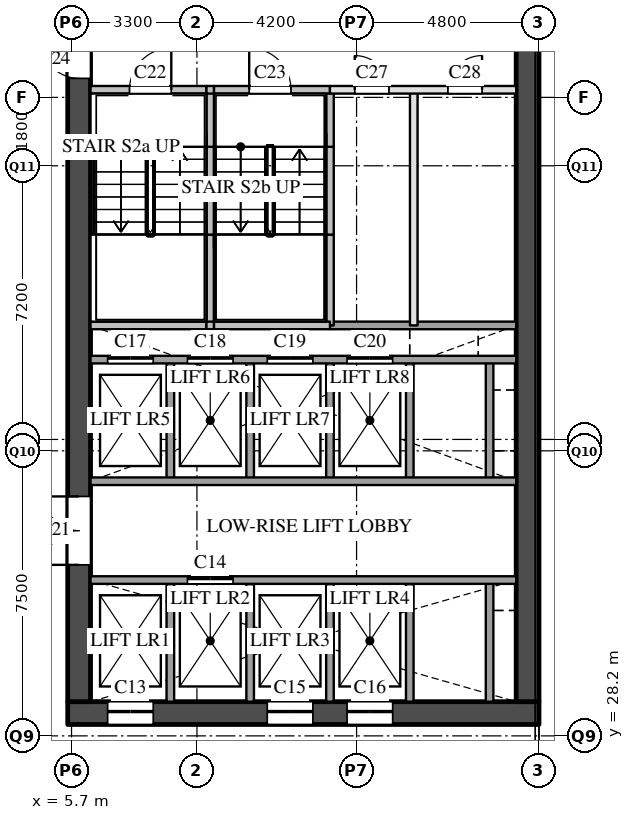
"""IFC4 building model, lengths in metres.
Left out: names, types, materials, properties, quantities, classifications, styles, units other than length and angle.
Written with IfcOpenShell. Run it as: python <this file> out.ifc"""

import sys

from ifc_helpers import new_model, si_unit, direction, frame, frame_2d, origin, place, context, subcontext, project, spatial, rectangle, extrude, element, fill, save


model = new_model("IFC4")
c1 = context("Model", 3, precision=1e-05, world=origin(), true_north=direction((0.0, 1.0)))
c2 = subcontext(c1, "Body", "Model", "MODEL_VIEW")
j1 = project(units=[si_unit("LENGTHUNIT", "METRE"), si_unit("PLANEANGLEUNIT", "RADIAN")], contexts=[c1])
p1 = place(None, origin())
s1 = spatial("IfcSite", under=j1, at=p1, CompositionType="ELEMENT")
p2 = place(p1, origin())
s2 = spatial("IfcBuilding", under=s1, at=p2, CompositionType="ELEMENT")
p3 = place(p2, frame((0.0, 0.0, 21.0)))
s3 = spatial("IfcBuildingStorey", under=s2, at=p3, CompositionType="ELEMENT", Elevation=21.0)
p4 = place(p3, frame((5.6, 28.8, 0.0), z_axis=(0.0, 0.0, 1.0), x_axis=(1.0, 0.0, 0.0)))
e1 = element("IfcWall", 1, at=p4, inside=s3, PredefinedType="SHEAR", context=c2, shape_type="SweptSolid", body=[
    extrude(rectangle(XDim=12.4, YDim=0.6, at=frame_2d((6.2, 0.0))), origin(), (0.0, 0.0, 1.0), 4.55),
])
p5 = place(p4, frame((1.05, 0.0, 0.0)))
e2 = element("IfcOpeningElement", 2, at=p5, cuts=e1, PredefinedType="OPENING", context=c2, shape_type="SweptSolid", body=[
    extrude(rectangle(XDim=1.2, YDim=2.1, at=frame_2d((0.6, 1.05))), frame((0.0, 0.31, 0.0), z_axis=(0.0, -1.0, 0.0), x_axis=(1.0, 0.0, 0.0)), (0.0, 0.0, 1.0), 0.62),
])
p6 = place(p4, frame((5.25, 0.0, 0.0)))
e3 = element("IfcOpeningElement", 3, at=p6, cuts=e1, PredefinedType="OPENING", context=c2, shape_type="SweptSolid", body=[
    extrude(rectangle(XDim=1.2, YDim=2.1, at=frame_2d((0.6, 1.05))), frame((0.0, 0.31, 0.0), z_axis=(0.0, -1.0, 0.0), x_axis=(1.0, 0.0, 0.0)), (0.0, 0.0, 1.0), 0.62),
])
p7 = place(p4, frame((7.35, 0.0, 0.0)))
e4 = element("IfcOpeningElement", 4, at=p7, cuts=e1, PredefinedType="OPENING", context=c2, shape_type="SweptSolid", body=[
    extrude(rectangle(XDim=1.2, YDim=2.1, at=frame_2d((0.6, 1.05))), frame((0.0, 0.31, 0.0), z_axis=(0.0, -1.0, 0.0), x_axis=(1.0, 0.0, 0.0)), (0.0, 0.0, 1.0), 0.62),
])
p8 = place(p3, frame((5.9, 29.1, 0.0), z_axis=(0.0, 0.0, 1.0), x_axis=(0.0, 1.0, 0.0)))
e5 = element("IfcWall", 5, at=p8, inside=s3, PredefinedType="SHEAR", context=c2, shape_type="SweptSolid", body=[
    extrude(rectangle(XDim=20.3, YDim=0.6, at=frame_2d((10.15, 0.0))), origin(), (0.0, 0.0, 1.0), 4.55),
])
p9 = place(p8, frame((3.6, 0.0, 0.0)))
e6 = element("IfcOpeningElement", 6, at=p9, cuts=e5, PredefinedType="OPENING", context=c2, shape_type="SweptSolid", body=[
    extrude(rectangle(XDim=1.8, YDim=2.1, at=frame_2d((0.9, 1.05))), frame((0.0, 0.31, 0.0), z_axis=(0.0, -1.0, 0.0), x_axis=(1.0, 0.0, 0.0)), (0.0, 0.0, 1.0), 0.62),
])
p10 = place(p8, frame((16.4, 0.0, 0.0)))
e7 = element("IfcOpeningElement", 7, at=p10, cuts=e5, PredefinedType="OPENING", context=c2, shape_type="SweptSolid", body=[
    extrude(rectangle(XDim=1.0, YDim=2.1, at=frame_2d((0.5, 1.05))), frame((0.0, 0.31, 0.0), z_axis=(0.0, -1.0, 0.0), x_axis=(1.0, 0.0, 0.0)), (0.0, 0.0, 1.0), 0.62),
])
p11 = place(p3, frame((17.7, 29.1, 0.0), z_axis=(0.0, 0.0, 1.0), x_axis=(0.0, 1.0, 0.0)))
e8 = element("IfcWall", 8, at=p11, inside=s3, PredefinedType="SHEAR", context=c2, shape_type="SweptSolid", body=[
    extrude(rectangle(XDim=20.3, YDim=0.6, at=frame_2d((10.15, 0.0))), origin(), (0.0, 0.0, 1.0), 4.55),
])
p12 = place(p3, frame((8.3, 29.1, 0.0), z_axis=(0.0, 0.0, 1.0), x_axis=(0.0, 1.0, 0.0)))
e9 = element("IfcWall", 9, at=p12, inside=s3, PredefinedType="SOLIDWALL", context=c2, shape_type="SweptSolid", body=[
    extrude(rectangle(XDim=3.2, YDim=0.2, at=frame_2d((1.6, 0.0))), origin(), (0.0, 0.0, 1.0), 4.55),
])
p13 = place(p3, frame((8.3, 34.9, 0.0), z_axis=(0.0, 0.0, 1.0), x_axis=(0.0, 1.0, 0.0)))
e10 = element("IfcWall", 10, at=p13, inside=s3, PredefinedType="SOLIDWALL", context=c2, shape_type="SweptSolid", body=[
    extrude(rectangle(XDim=3.2, YDim=0.2, at=frame_2d((1.6, 0.0))), origin(), (0.0, 0.0, 1.0), 4.55),
])
p14 = place(p3, frame((9.35, 39.0, 0.0), z_axis=(0.0, 0.0, 1.0), x_axis=(0.0, 1.0, 0.0)))
e11 = element("IfcWall", 11, at=p14, inside=s3, PredefinedType="SOLIDWALL", context=c2, shape_type="SweptSolid", body=[
    extrude(rectangle(XDim=2.39, YDim=0.2, at=frame_2d((1.195, 0.0))), origin(), (0.0, 0.0, 1.0), 4.55),
])
p15 = place(p3, frame((9.35, 41.39, 0.0), z_axis=(0.0, 0.0, 1.0), x_axis=(0.0, 1.0, 0.0)))
e12 = element("IfcWall", 12, at=p15, inside=s3, PredefinedType="SOLIDWALL", context=c2, shape_type="SweptSolid", body=[
    extrude(rectangle(XDim=2.31, YDim=0.2, at=frame_2d((1.155, 0.0))), origin(), (0.0, 0.0, 1.0), 4.55),
])
p16 = place(p3, frame((9.35, 43.7, 0.0), z_axis=(0.0, 0.0, 1.0), x_axis=(0.0, 1.0, 0.0)))
e13 = element("IfcWall", 13, at=p16, inside=s3, PredefinedType="SOLIDWALL", context=c2, shape_type="SweptSolid", body=[
    extrude(rectangle(XDim=1.5, YDim=0.2, at=frame_2d((0.75, 0.0))), origin(), (0.0, 0.0, 1.0), 4.55),
])
p17 = place(p3, frame((10.4, 29.1, 0.0), z_axis=(0.0, 0.0, 1.0), x_axis=(0.0, 1.0, 0.0)))
e14 = element("IfcWall", 14, at=p17, inside=s3, PredefinedType="SOLIDWALL", context=c2, shape_type="SweptSolid", body=[
    extrude(rectangle(XDim=3.2, YDim=0.2, at=frame_2d((1.6, 0.0))), origin(), (0.0, 0.0, 1.0), 4.55),
])
p18 = place(p3, frame((10.4, 34.9, 0.0), z_axis=(0.0, 0.0, 1.0), x_axis=(0.0, 1.0, 0.0)))
e15 = element("IfcWall", 15, at=p18, inside=s3, PredefinedType="SOLIDWALL", context=c2, shape_type="SweptSolid", body=[
    extrude(rectangle(XDim=3.2, YDim=0.2, at=frame_2d((1.6, 0.0))), origin(), (0.0, 0.0, 1.0), 4.55),
])
p19 = place(p3, frame((12.5, 29.1, 0.0), z_axis=(0.0, 0.0, 1.0), x_axis=(0.0, 1.0, 0.0)))
e16 = element("IfcWall", 16, at=p19, inside=s3, PredefinedType="SOLIDWALL", context=c2, shape_type="SweptSolid", body=[
    extrude(rectangle(XDim=3.2, YDim=0.2, at=frame_2d((1.6, 0.0))), origin(), (0.0, 0.0, 1.0), 4.55),
])
p20 = place(p3, frame((12.5, 34.9, 0.0), z_axis=(0.0, 0.0, 1.0), x_axis=(0.0, 1.0, 0.0)))
e17 = element("IfcWall", 17, at=p20, inside=s3, PredefinedType="SOLIDWALL", context=c2, shape_type="SweptSolid", body=[
    extrude(rectangle(XDim=3.2, YDim=0.2, at=frame_2d((1.6, 0.0))), origin(), (0.0, 0.0, 1.0), 4.55),
])
p21 = place(p3, frame((12.5, 39.0, 0.0), z_axis=(0.0, 0.0, 1.0), x_axis=(0.0, 1.0, 0.0)))
e18 = element("IfcWall", 18, at=p21, inside=s3, PredefinedType="SOLIDWALL", context=c2, shape_type="SweptSolid", body=[
    extrude(rectangle(XDim=2.39, YDim=0.2, at=frame_2d((1.195, 0.0))), origin(), (0.0, 0.0, 1.0), 4.55),
])
p22 = place(p3, frame((12.5, 41.39, 0.0), z_axis=(0.0, 0.0, 1.0), x_axis=(0.0, 1.0, 0.0)))
e19 = element("IfcWall", 19, at=p22, inside=s3, PredefinedType="SOLIDWALL", context=c2, shape_type="SweptSolid", body=[
    extrude(rectangle(XDim=2.31, YDim=0.2, at=frame_2d((1.155, 0.0))), origin(), (0.0, 0.0, 1.0), 4.55),
])
p23 = place(p3, frame((12.5, 43.7, 0.0), z_axis=(0.0, 0.0, 1.0), x_axis=(0.0, 1.0, 0.0)))
e20 = element("IfcWall", 20, at=p23, inside=s3, PredefinedType="SOLIDWALL", context=c2, shape_type="SweptSolid", body=[
    extrude(rectangle(XDim=1.5, YDim=0.2, at=frame_2d((0.75, 0.0))), origin(), (0.0, 0.0, 1.0), 4.55),
])
p24 = place(p3, frame((14.6, 29.1, 0.0), z_axis=(0.0, 0.0, 1.0), x_axis=(0.0, 1.0, 0.0)))
e21 = element("IfcWall", 21, at=p24, inside=s3, PredefinedType="SOLIDWALL", context=c2, shape_type="SweptSolid", body=[
    extrude(rectangle(XDim=3.2, YDim=0.2, at=frame_2d((1.6, 0.0))), origin(), (0.0, 0.0, 1.0), 4.55),
])
p25 = place(p3, frame((14.6, 34.9, 0.0), z_axis=(0.0, 0.0, 1.0), x_axis=(0.0, 1.0, 0.0)))
e22 = element("IfcWall", 22, at=p25, inside=s3, PredefinedType="SOLIDWALL", context=c2, shape_type="SweptSolid", body=[
    extrude(rectangle(XDim=3.2, YDim=0.2, at=frame_2d((1.6, 0.0))), origin(), (0.0, 0.0, 1.0), 4.55),
])
p26 = place(p3, frame((14.705, 39.0, 0.0), z_axis=(0.0, 0.0, 1.0), x_axis=(0.0, 1.0, 0.0)))
e23 = element("IfcWall", 23, at=p26, inside=s3, PredefinedType="PARTITIONING", context=c2, shape_type="SweptSolid", body=[
    extrude(rectangle(XDim=6.2, YDim=0.2, at=frame_2d((3.1, 0.0))), origin(), (0.0, 0.0, 1.0), 4.55),
])
p27 = place(p3, frame((16.7, 29.1, 0.0), z_axis=(0.0, 0.0, 1.0), x_axis=(0.0, 1.0, 0.0)))
e24 = element("IfcWall", 24, at=p27, inside=s3, PredefinedType="SOLIDWALL", context=c2, shape_type="SweptSolid", body=[
    extrude(rectangle(XDim=3.2, YDim=0.2, at=frame_2d((1.6, 0.0))), origin(), (0.0, 0.0, 1.0), 4.55),
])
p28 = place(p3, frame((16.7, 34.9, 0.0), z_axis=(0.0, 0.0, 1.0), x_axis=(0.0, 1.0, 0.0)))
e25 = element("IfcWall", 25, at=p28, inside=s3, PredefinedType="SOLIDWALL", context=c2, shape_type="SweptSolid", body=[
    extrude(rectangle(XDim=3.2, YDim=0.2, at=frame_2d((1.6, 0.0))), origin(), (0.0, 0.0, 1.0), 4.55),
])
p29 = place(p3, frame((6.2, 32.3, 0.0), z_axis=(0.0, 0.0, 1.0), x_axis=(1.0, 0.0, 0.0)))
e26 = element("IfcWall", 26, at=p29, inside=s3, PredefinedType="SOLIDWALL", context=c2, shape_type="SweptSolid", body=[
    extrude(rectangle(XDim=11.2, YDim=0.2, at=frame_2d((5.6, 0.0))), origin(), (0.0, 0.0, 1.0), 4.55),
])
p30 = place(p29, frame((2.55, 0.0, 0.0)))
e27 = element("IfcOpeningElement", 27, at=p30, cuts=e26, PredefinedType="OPENING", context=c2, shape_type="SweptSolid", body=[
    extrude(rectangle(XDim=1.2, YDim=2.1, at=frame_2d((0.6, 1.05))), frame((0.0, 0.11, 0.0), z_axis=(0.0, -1.0, 0.0), x_axis=(1.0, 0.0, 0.0)), (0.0, 0.0, 1.0), 0.22),
])
p31 = place(p3, frame((6.2, 34.9, 0.0), z_axis=(0.0, 0.0, 1.0), x_axis=(1.0, 0.0, 0.0)))
e28 = element("IfcWall", 28, at=p31, inside=s3, PredefinedType="SOLIDWALL", context=c2, shape_type="SweptSolid", body=[
    extrude(rectangle(XDim=11.2, YDim=0.2, at=frame_2d((5.6, 0.0))), origin(), (0.0, 0.0, 1.0), 4.55),
])
p32 = place(p3, frame((6.2, 38.1, 0.0), z_axis=(0.0, 0.0, 1.0), x_axis=(1.0, 0.0, 0.0)))
e29 = element("IfcWall", 29, at=p32, inside=s3, PredefinedType="SOLIDWALL", context=c2, shape_type="SweptSolid", body=[
    extrude(rectangle(XDim=11.2, YDim=0.2, at=frame_2d((5.6, 0.0))), origin(), (0.0, 0.0, 1.0), 4.55),
])
p33 = place(p32, frame((0.45, 0.0, 0.0)))
e30 = element("IfcOpeningElement", 30, at=p33, cuts=e29, PredefinedType="OPENING", context=c2, shape_type="SweptSolid", body=[
    extrude(rectangle(XDim=1.2, YDim=2.1, at=frame_2d((0.6, 1.05))), frame((0.0, 0.11, 0.0), z_axis=(0.0, -1.0, 0.0), x_axis=(1.0, 0.0, 0.0)), (0.0, 0.0, 1.0), 0.22),
])
p34 = place(p32, frame((2.55, 0.0, 0.0)))
e31 = element("IfcOpeningElement", 31, at=p34, cuts=e29, PredefinedType="OPENING", context=c2, shape_type="SweptSolid", body=[
    extrude(rectangle(XDim=1.2, YDim=2.1, at=frame_2d((0.6, 1.05))), frame((0.0, 0.11, 0.0), z_axis=(0.0, -1.0, 0.0), x_axis=(1.0, 0.0, 0.0)), (0.0, 0.0, 1.0), 0.22),
])
p35 = place(p32, frame((4.65, 0.0, 0.0)))
e32 = element("IfcOpeningElement", 32, at=p35, cuts=e29, PredefinedType="OPENING", context=c2, shape_type="SweptSolid", body=[
    extrude(rectangle(XDim=1.2, YDim=2.1, at=frame_2d((0.6, 1.05))), frame((0.0, 0.11, 0.0), z_axis=(0.0, -1.0, 0.0), x_axis=(1.0, 0.0, 0.0)), (0.0, 0.0, 1.0), 0.22),
])
p36 = place(p32, frame((6.75, 0.0, 0.0)))
e33 = element("IfcOpeningElement", 33, at=p36, cuts=e29, PredefinedType="OPENING", context=c2, shape_type="SweptSolid", body=[
    extrude(rectangle(XDim=1.2, YDim=2.1, at=frame_2d((0.6, 1.05))), frame((0.0, 0.11, 0.0), z_axis=(0.0, -1.0, 0.0), x_axis=(1.0, 0.0, 0.0)), (0.0, 0.0, 1.0), 0.22),
])
p37 = place(p3, frame((12.5, 39.0, 0.0), z_axis=(0.0, 0.0, 1.0), x_axis=(1.0, 0.0, 0.0)))
e34 = element("IfcWall", 34, at=p37, inside=s3, PredefinedType="SOLIDWALL", context=c2, shape_type="SweptSolid", body=[
    extrude(rectangle(XDim=4.9, YDim=0.2, at=frame_2d((2.45, 0.0))), origin(), (0.0, 0.0, 1.0), 4.55),
])
p38 = place(p3, frame((6.2, 39.0, 0.0), z_axis=(0.0, 0.0, 1.0), x_axis=(1.0, 0.0, 0.0)))
e35 = element("IfcWall", 35, at=p38, inside=s3, PredefinedType="SOLIDWALL", context=c2, shape_type="SweptSolid", body=[
    extrude(rectangle(XDim=3.05, YDim=0.2, at=frame_2d((1.525, 0.0))), origin(), (0.0, 0.0, 1.0), 4.55),
])
p39 = place(p3, frame((9.25, 39.0, 0.0), z_axis=(0.0, 0.0, 1.0), x_axis=(1.0, 0.0, 0.0)))
e36 = element("IfcWall", 36, at=p39, inside=s3, PredefinedType="SOLIDWALL", context=c2, shape_type="SweptSolid", body=[
    extrude(rectangle(XDim=0.2, YDim=0.2, at=frame_2d((0.1, 0.0))), origin(), (0.0, 0.0, 1.0), 4.55),
])
p40 = place(p3, frame((9.45, 39.0, 0.0), z_axis=(0.0, 0.0, 1.0), x_axis=(1.0, 0.0, 0.0)))
e37 = element("IfcWall", 37, at=p40, inside=s3, PredefinedType="SOLIDWALL", context=c2, shape_type="SweptSolid", body=[
    extrude(rectangle(XDim=3.05, YDim=0.2, at=frame_2d((1.525, 0.0))), origin(), (0.0, 0.0, 1.0), 4.55),
])
p41 = place(p3, frame((12.5, 45.2, 0.0), z_axis=(0.0, 0.0, 1.0), x_axis=(1.0, 0.0, 0.0)))
e38 = element("IfcWall", 38, at=p41, inside=s3, PredefinedType="PARTITIONING", context=c2, shape_type="SweptSolid", body=[
    extrude(rectangle(XDim=4.9, YDim=0.2, at=frame_2d((2.45, 0.0))), origin(), (0.0, 0.0, 1.0), 4.55),
])
p42 = place(p41, frame((0.653, 0.0, 0.0)))
e39 = element("IfcOpeningElement", 39, at=p42, cuts=e38, PredefinedType="OPENING", context=c2, shape_type="SweptSolid", body=[
    extrude(rectangle(XDim=0.9, YDim=2.1, at=frame_2d((0.45, 1.05))), frame((0.0, 0.11, 0.0), z_axis=(0.0, -1.0, 0.0), x_axis=(1.0, 0.0, 0.0)), (0.0, 0.0, 1.0), 0.22),
])
p43 = place(p41, frame((3.103, 0.0, 0.0)))
e40 = element("IfcOpeningElement", 40, at=p43, cuts=e38, PredefinedType="OPENING", context=c2, shape_type="SweptSolid", body=[
    extrude(rectangle(XDim=0.9, YDim=2.1, at=frame_2d((0.45, 1.05))), frame((0.0, 0.11, 0.0), z_axis=(0.0, -1.0, 0.0), x_axis=(1.0, 0.0, 0.0)), (0.0, 0.0, 1.0), 0.22),
])
p44 = place(p3, frame((6.2, 45.2, 0.0), z_axis=(0.0, 0.0, 1.0), x_axis=(1.0, 0.0, 0.0)))
e41 = element("IfcWall", 41, at=p44, inside=s3, PredefinedType="SOLIDWALL", context=c2, shape_type="SweptSolid", body=[
    extrude(rectangle(XDim=3.05, YDim=0.2, at=frame_2d((1.525, 0.0))), origin(), (0.0, 0.0, 1.0), 4.55),
])
p45 = place(p44, frame((1.025, 0.0, 0.0)))
e42 = element("IfcOpeningElement", 42, at=p45, cuts=e41, PredefinedType="OPENING", context=c2, shape_type="SweptSolid", body=[
    extrude(rectangle(XDim=1.1, YDim=2.1, at=frame_2d((0.55, 1.05))), frame((0.0, 0.11, 0.0), z_axis=(0.0, -1.0, 0.0), x_axis=(1.0, 0.0, 0.0)), (0.0, 0.0, 1.0), 0.22),
])
p46 = place(p3, frame((9.25, 45.2, 0.0), z_axis=(0.0, 0.0, 1.0), x_axis=(1.0, 0.0, 0.0)))
e43 = element("IfcWall", 43, at=p46, inside=s3, PredefinedType="SOLIDWALL", context=c2, shape_type="SweptSolid", body=[
    extrude(rectangle(XDim=0.2, YDim=0.2, at=frame_2d((0.1, 0.0))), origin(), (0.0, 0.0, 1.0), 4.55),
])
p47 = place(p3, frame((9.45, 45.2, 0.0), z_axis=(0.0, 0.0, 1.0), x_axis=(1.0, 0.0, 0.0)))
e44 = element("IfcWall", 44, at=p47, inside=s3, PredefinedType="SOLIDWALL", context=c2, shape_type="SweptSolid", body=[
    extrude(rectangle(XDim=3.05, YDim=0.2, at=frame_2d((1.525, 0.0))), origin(), (0.0, 0.0, 1.0), 4.55),
])
p48 = place(p47, frame((0.925, 0.0, 0.0)))
e45 = element("IfcOpeningElement", 45, at=p48, cuts=e44, PredefinedType="OPENING", context=c2, shape_type="SweptSolid", body=[
    extrude(rectangle(XDim=1.1, YDim=2.1, at=frame_2d((0.55, 1.05))), frame((0.0, 0.11, 0.0), z_axis=(0.0, -1.0, 0.0), x_axis=(1.0, 0.0, 0.0)), (0.0, 0.0, 1.0), 0.22),
])
p49 = place(p5, origin())
e46 = element("IfcDoor", 46, at=p49, inside=s3, OperationType="SLIDING_TO_LEFT", PredefinedType="DOOR", context=c2, shape_type="SweptSolid", body=[
    extrude(rectangle(XDim=1.2, YDim=2.1, at=frame_2d((0.6, 1.05))), frame((0.0, 0.025, 0.0), z_axis=(0.0, -1.0, 0.0), x_axis=(1.0, 0.0, 0.0)), (0.0, 0.0, 1.0), 0.05),
])
fill(e2, e46)
p50 = place(p30, origin())
e47 = element("IfcDoor", 47, at=p50, inside=s3, OperationType="SLIDING_TO_LEFT", PredefinedType="DOOR", context=c2, shape_type="SweptSolid", body=[
    extrude(rectangle(XDim=1.2, YDim=2.1, at=frame_2d((0.6, 1.05))), frame((0.0, 0.025, 0.0), z_axis=(0.0, -1.0, 0.0), x_axis=(1.0, 0.0, 0.0)), (0.0, 0.0, 1.0), 0.05),
])
fill(e27, e47)
p51 = place(p6, origin())
e48 = element("IfcDoor", 48, at=p51, inside=s3, OperationType="SLIDING_TO_LEFT", PredefinedType="DOOR", context=c2, shape_type="SweptSolid", body=[
    extrude(rectangle(XDim=1.2, YDim=2.1, at=frame_2d((0.6, 1.05))), frame((0.0, 0.025, 0.0), z_axis=(0.0, -1.0, 0.0), x_axis=(1.0, 0.0, 0.0)), (0.0, 0.0, 1.0), 0.05),
])
fill(e3, e48)
p52 = place(p7, origin())
e49 = element("IfcDoor", 49, at=p52, inside=s3, OperationType="SLIDING_TO_LEFT", PredefinedType="DOOR", context=c2, shape_type="SweptSolid", body=[
    extrude(rectangle(XDim=1.2, YDim=2.1, at=frame_2d((0.6, 1.05))), frame((0.0, 0.025, 0.0), z_axis=(0.0, -1.0, 0.0), x_axis=(1.0, 0.0, 0.0)), (0.0, 0.0, 1.0), 0.05),
])
fill(e4, e49)
p53 = place(p33, origin())
e50 = element("IfcDoor", 50, at=p53, inside=s3, OperationType="SLIDING_TO_LEFT", PredefinedType="DOOR", context=c2, shape_type="SweptSolid", body=[
    extrude(rectangle(XDim=1.2, YDim=2.1, at=frame_2d((0.6, 1.05))), frame((0.0, 0.025, 0.0), z_axis=(0.0, -1.0, 0.0), x_axis=(1.0, 0.0, 0.0)), (0.0, 0.0, 1.0), 0.05),
])
fill(e30, e50)
p54 = place(p34, origin())
e51 = element("IfcDoor", 51, at=p54, inside=s3, OperationType="SLIDING_TO_LEFT", PredefinedType="DOOR", context=c2, shape_type="SweptSolid", body=[
    extrude(rectangle(XDim=1.2, YDim=2.1, at=frame_2d((0.6, 1.05))), frame((0.0, 0.025, 0.0), z_axis=(0.0, -1.0, 0.0), x_axis=(1.0, 0.0, 0.0)), (0.0, 0.0, 1.0), 0.05),
])
fill(e31, e51)
p55 = place(p35, origin())
e52 = element("IfcDoor", 52, at=p55, inside=s3, OperationType="SLIDING_TO_LEFT", PredefinedType="DOOR", context=c2, shape_type="SweptSolid", body=[
    extrude(rectangle(XDim=1.2, YDim=2.1, at=frame_2d((0.6, 1.05))), frame((0.0, 0.025, 0.0), z_axis=(0.0, -1.0, 0.0), x_axis=(1.0, 0.0, 0.0)), (0.0, 0.0, 1.0), 0.05),
])
fill(e32, e52)
p56 = place(p36, origin())
e53 = element("IfcDoor", 53, at=p56, inside=s3, OperationType="SLIDING_TO_LEFT", PredefinedType="DOOR", context=c2, shape_type="SweptSolid", body=[
    extrude(rectangle(XDim=1.2, YDim=2.1, at=frame_2d((0.6, 1.05))), frame((0.0, 0.025, 0.0), z_axis=(0.0, -1.0, 0.0), x_axis=(1.0, 0.0, 0.0)), (0.0, 0.0, 1.0), 0.05),
])
fill(e33, e53)
p57 = place(p9, origin())
e54 = element("IfcDoor", 54, at=p57, inside=s3, OperationType="DOUBLE_DOOR_SINGLE_SWING", PredefinedType="DOOR", context=c2, shape_type="SweptSolid", body=[
    extrude(rectangle(XDim=1.8, YDim=2.1, at=frame_2d((0.9, 1.05))), frame((0.0, 0.025, 0.0), z_axis=(0.0, -1.0, 0.0), x_axis=(1.0, 0.0, 0.0)), (0.0, 0.0, 1.0), 0.05),
])
fill(e6, e54)
p58 = place(p45, origin())
e55 = element("IfcDoor", 55, at=p58, inside=s3, OperationType="SINGLE_SWING_RIGHT", PredefinedType="DOOR", context=c2, shape_type="SweptSolid", body=[
    extrude(rectangle(XDim=1.1, YDim=2.1, at=frame_2d((0.55, 1.05))), frame((0.0, 0.025, 0.0), z_axis=(0.0, -1.0, 0.0), x_axis=(1.0, 0.0, 0.0)), (0.0, 0.0, 1.0), 0.05),
])
fill(e42, e55)
p59 = place(p48, origin())
e56 = element("IfcDoor", 56, at=p59, inside=s3, OperationType="SINGLE_SWING_LEFT", PredefinedType="DOOR", context=c2, shape_type="SweptSolid", body=[
    extrude(rectangle(XDim=1.1, YDim=2.1, at=frame_2d((0.55, 1.05))), frame((0.0, 0.025, 0.0), z_axis=(0.0, -1.0, 0.0), x_axis=(1.0, 0.0, 0.0)), (0.0, 0.0, 1.0), 0.05),
])
fill(e45, e56)
p60 = place(p10, origin())
e57 = element("IfcDoor", 57, at=p60, inside=s3, OperationType="SINGLE_SWING_RIGHT", PredefinedType="DOOR", context=c2, shape_type="SweptSolid", body=[
    extrude(rectangle(XDim=1.0, YDim=2.1, at=frame_2d((0.5, 1.05))), frame((0.0, 0.025, 0.0), z_axis=(0.0, -1.0, 0.0), x_axis=(1.0, 0.0, 0.0)), (0.0, 0.0, 1.0), 0.05),
])
fill(e7, e57)
p61 = place(p42, origin())
e58 = element("IfcDoor", 58, at=p61, inside=s3, OperationType="SINGLE_SWING_LEFT", PredefinedType="DOOR", context=c2, shape_type="SweptSolid", body=[
    extrude(rectangle(XDim=0.9, YDim=2.1, at=frame_2d((0.45, 1.05))), frame((0.0, 0.025, 0.0), z_axis=(0.0, -1.0, 0.0), x_axis=(1.0, 0.0, 0.0)), (0.0, 0.0, 1.0), 0.05),
])
fill(e39, e58)
p62 = place(p43, origin())
e59 = element("IfcDoor", 59, at=p62, inside=s3, OperationType="SINGLE_SWING_RIGHT", PredefinedType="DOOR", context=c2, shape_type="SweptSolid", body=[
    extrude(rectangle(XDim=0.9, YDim=2.1, at=frame_2d((0.45, 1.05))), frame((0.0, 0.025, 0.0), z_axis=(0.0, -1.0, 0.0), x_axis=(1.0, 0.0, 0.0)), (0.0, 0.0, 1.0), 0.05),
])
fill(e40, e59)
save(model, sys.argv[1])
